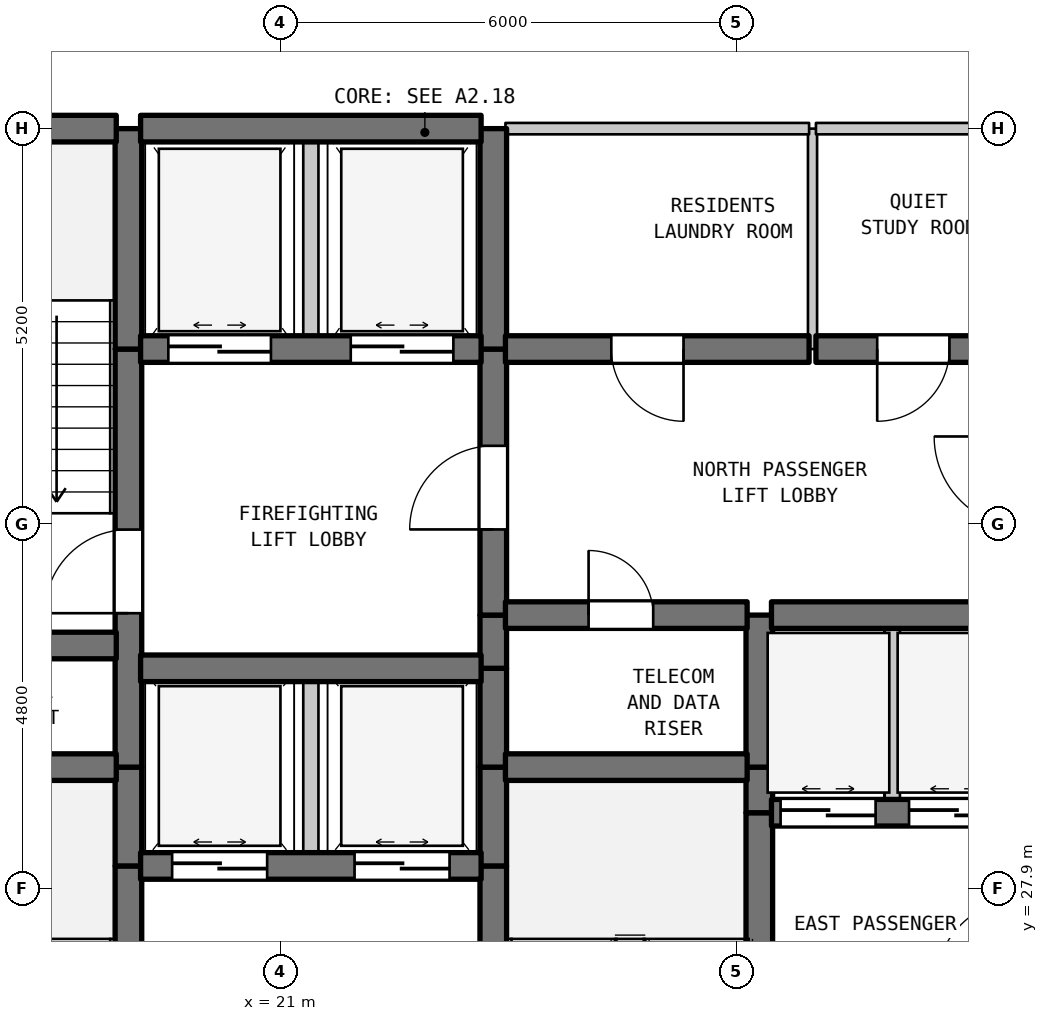
"""IFC4 building model, lengths in metres.
Left out: names, types, materials, properties, quantities, classifications, styles, units other than length and angle.
Written with IfcOpenShell. Run it as: python <this file> out.ifc"""

import sys

from ifc_helpers import new_model, si_unit, direction, frame, frame_2d, origin, place, context, subcontext, project, spatial, rectangle, extrude, element, fill, save


model = new_model("IFC4")
c1 = context("Model", 3, precision=1e-05, world=origin(), true_north=direction((0.0, 1.0)))
c2 = subcontext(c1, "Body", "Model", "MODEL_VIEW")
j1 = project(units=[si_unit("LENGTHUNIT", "METRE"), si_unit("PLANEANGLEUNIT", "RADIAN")], contexts=[c1])
p1 = place(None, origin())
s1 = spatial("IfcSite", under=j1, at=p1, CompositionType="ELEMENT")
p2 = place(p1, origin())
s2 = spatial("IfcBuilding", under=s1, at=p2, CompositionType="ELEMENT")
p3 = place(p2, frame((0.0, 0.0, 195.8)))
s3 = spatial("IfcBuildingStorey", under=s2, at=p3, CompositionType="ELEMENT", Elevation=195.8)
p4 = place(p3, frame((19.0, 22.7, 0.0), z_axis=(0.0, 0.0, 1.0), x_axis=(0.0, 1.0, 0.0)))
e1 = element("IfcWall", 1, at=p4, inside=s3, PredefinedType="SHEAR", context=c2, shape_type="SweptSolid", body=[
    extrude(rectangle(XDim=5.5, YDim=0.35, at=frame_2d((2.75, 0.0))), origin(), (0.0, 0.0, 1.0), 3.39),
])
p5 = place(p4, frame((0.631, 0.0, 0.0)))
e2 = element("IfcOpeningElement", 2, at=p5, cuts=e1, PredefinedType="OPENING", context=c2, shape_type="SweptSolid", body=[
    extrude(rectangle(XDim=1.1, YDim=2.15, at=frame_2d((0.55, 1.075))), frame((0.0, 0.185, 0.0), z_axis=(0.0, -1.0, 0.0), x_axis=(1.0, 0.0, 0.0)), (0.0, 0.0, 1.0), 0.37),
])
p6 = place(p3, frame((19.0, 28.2, 0.0), z_axis=(0.0, 0.0, 1.0), x_axis=(0.0, 1.0, 0.0)))
e3 = element("IfcWall", 3, at=p6, inside=s3, PredefinedType="SHEAR", context=c2, shape_type="SweptSolid", body=[
    extrude(rectangle(XDim=1.3, YDim=0.35, at=frame_2d((0.65, 0.0))), origin(), (0.0, 0.0, 1.0), 3.39),
])
p7 = place(p3, frame((19.0, 29.5, 0.0), z_axis=(0.0, 0.0, 1.0), x_axis=(0.0, 1.0, 0.0)))
e4 = element("IfcWall", 4, at=p7, inside=s3, PredefinedType="SHEAR", context=c2, shape_type="SweptSolid", body=[
    extrude(rectangle(XDim=5.5, YDim=0.35, at=frame_2d((2.75, 0.0))), origin(), (0.0, 0.0, 1.0), 3.39),
])
p8 = place(p7, frame((2.025, 0.0, 0.0)))
e5 = element("IfcOpeningElement", 5, at=p8, cuts=e4, PredefinedType="OPENING", context=c2, shape_type="SweptSolid", body=[
    extrude(rectangle(XDim=1.1, YDim=2.15, at=frame_2d((0.55, 1.075))), frame((0.0, 0.185, 0.0), z_axis=(0.0, -1.0, 0.0), x_axis=(1.0, 0.0, 0.0)), (0.0, 0.0, 1.0), 0.37),
])
p9 = place(p3, frame((19.0, 35.0, 0.0), z_axis=(0.0, 0.0, 1.0), x_axis=(0.0, 1.0, 0.0)))
e6 = element("IfcWall", 6, at=p9, inside=s3, PredefinedType="SHEAR", context=c2, shape_type="SweptSolid", body=[
    extrude(rectangle(XDim=2.9, YDim=0.35, at=frame_2d((1.45, 0.0))), origin(), (0.0, 0.0, 1.0), 3.39),
])
p10 = place(p3, frame((21.4, 28.2, 0.0), z_axis=(0.0, 0.0, 1.0), x_axis=(0.0, 1.0, 0.0)))
e7 = element("IfcWall", 7, at=p10, inside=s3, PredefinedType="STANDARD", context=c2, shape_type="SweptSolid", body=[
    extrude(rectangle(XDim=2.6, YDim=0.2, at=frame_2d((1.3, 0.0))), origin(), (0.0, 0.0, 1.0), 3.39),
])
p11 = place(p3, frame((21.4, 35.0, 0.0), z_axis=(0.0, 0.0, 1.0), x_axis=(0.0, 1.0, 0.0)))
e8 = element("IfcWall", 8, at=p11, inside=s3, PredefinedType="STANDARD", context=c2, shape_type="SweptSolid", body=[
    extrude(rectangle(XDim=2.9, YDim=0.2, at=frame_2d((1.45, 0.0))), origin(), (0.0, 0.0, 1.0), 3.39),
])
p12 = place(p3, frame((23.8, 22.7, 0.0), z_axis=(0.0, 0.0, 1.0), x_axis=(0.0, 1.0, 0.0)))
e9 = element("IfcWall", 9, at=p12, inside=s3, PredefinedType="SHEAR", context=c2, shape_type="SweptSolid", body=[
    extrude(rectangle(XDim=5.5, YDim=0.35, at=frame_2d((2.75, 0.0))), origin(), (0.0, 0.0, 1.0), 3.39),
])
p13 = place(p12, frame((0.235, 0.0, 0.0)))
e10 = element("IfcOpeningElement", 10, at=p13, cuts=e9, PredefinedType="OPENING", context=c2, shape_type="SweptSolid", body=[
    extrude(rectangle(XDim=1.1, YDim=2.15, at=frame_2d((0.55, 1.075))), frame((0.0, 0.185, 0.0), z_axis=(0.0, -1.0, 0.0), x_axis=(1.0, 0.0, 0.0)), (0.0, 0.0, 1.0), 0.37),
])
for number, where, z_axis, x_axis in (
    (11, (23.8, 28.2, 0.0), (0.0, 0.0, 1.0), (0.0, 1.0, 0.0)),
    (12, (23.8, 29.5, 0.0), (0.0, 0.0, 1.0), (0.0, 1.0, 0.0)),
):
    element("IfcWall", number, at=place(p3, frame(where, z_axis=z_axis, x_axis=x_axis)), inside=s3, PredefinedType="SHEAR", context=c2, shape_type="SweptSolid", body=[
        extrude(rectangle(XDim=1.3, YDim=0.35, at=frame_2d((0.65, 0.0))), origin(), (0.0, 0.0, 1.0), 3.39),
    ])
p14 = place(p3, frame((23.8, 30.8, 0.0), z_axis=(0.0, 0.0, 1.0), x_axis=(0.0, 1.0, 0.0)))
e13 = element("IfcWall", 13, at=p14, inside=s3, PredefinedType="SHEAR", context=c2, shape_type="SweptSolid", body=[
    extrude(rectangle(XDim=0.7, YDim=0.35, at=frame_2d((0.35, 0.0))), origin(), (0.0, 0.0, 1.0), 3.39),
])
p15 = place(p3, frame((23.8, 31.5, 0.0), z_axis=(0.0, 0.0, 1.0), x_axis=(0.0, 1.0, 0.0)))
e14 = element("IfcWall", 14, at=p15, inside=s3, PredefinedType="SHEAR", context=c2, shape_type="SweptSolid", body=[
    extrude(rectangle(XDim=3.5, YDim=0.35, at=frame_2d((1.75, 0.0))), origin(), (0.0, 0.0, 1.0), 3.39),
])
p16 = place(p15, frame((1.127, 0.0, 0.0)))
e15 = element("IfcOpeningElement", 15, at=p16, cuts=e14, PredefinedType="OPENING", context=c2, shape_type="SweptSolid", body=[
    extrude(rectangle(XDim=1.1, YDim=2.15, at=frame_2d((0.55, 1.075))), frame((0.0, 0.185, 0.0), z_axis=(0.0, -1.0, 0.0), x_axis=(1.0, 0.0, 0.0)), (0.0, 0.0, 1.0), 0.37),
])
p17 = place(p3, frame((23.8, 35.0, 0.0), z_axis=(0.0, 0.0, 1.0), x_axis=(0.0, 1.0, 0.0)))
e16 = element("IfcWall", 16, at=p17, inside=s3, PredefinedType="SHEAR", context=c2, shape_type="SweptSolid", body=[
    extrude(rectangle(XDim=2.9, YDim=0.35, at=frame_2d((1.45, 0.0))), origin(), (0.0, 0.0, 1.0), 3.39),
])
p18 = place(p3, frame((27.3, 25.6, 0.0), z_axis=(0.0, 0.0, 1.0), x_axis=(0.0, 1.0, 0.0)))
e17 = element("IfcWall", 17, at=p18, inside=s3, PredefinedType="SHEAR", context=c2, shape_type="SweptSolid", body=[
    extrude(rectangle(XDim=3.3, YDim=0.35, at=frame_2d((1.65, 0.0))), origin(), (0.0, 0.0, 1.0), 3.39),
])
p19 = place(p3, frame((27.3, 28.9, 0.0), z_axis=(0.0, 0.0, 1.0), x_axis=(0.0, 1.0, 0.0)))
e18 = element("IfcWall", 18, at=p19, inside=s3, PredefinedType="SHEAR", context=c2, shape_type="SweptSolid", body=[
    extrude(rectangle(XDim=0.6, YDim=0.35, at=frame_2d((0.3, 0.0))), origin(), (0.0, 0.0, 1.0), 3.39),
])
p20 = place(p3, frame((27.3, 29.5, 0.0), z_axis=(0.0, 0.0, 1.0), x_axis=(0.0, 1.0, 0.0)))
e19 = element("IfcWall", 19, at=p20, inside=s3, PredefinedType="SHEAR", context=c2, shape_type="SweptSolid", body=[
    extrude(rectangle(XDim=2.0, YDim=0.35, at=frame_2d((1.0, 0.0))), origin(), (0.0, 0.0, 1.0), 3.39),
])
p21 = place(p3, frame((28.0, 35.0, 0.0), z_axis=(0.0, 0.0, 1.0), x_axis=(0.0, 1.0, 0.0)))
e20 = element("IfcWall", 20, at=p21, inside=s3, PredefinedType="PARTITIONING", context=c2, shape_type="SweptSolid", body=[
    extrude(rectangle(XDim=2.9, YDim=0.12, at=frame_2d((1.45, 0.0))), origin(), (0.0, 0.0, 1.0), 3.39),
])
p22 = place(p3, frame((29.05, 28.9, 0.0), z_axis=(0.0, 0.0, 1.0), x_axis=(0.0, 1.0, 0.0)))
e21 = element("IfcWall", 21, at=p22, inside=s3, PredefinedType="STANDARD", context=c2, shape_type="SweptSolid", body=[
    extrude(rectangle(XDim=2.6, YDim=0.2, at=frame_2d((1.3, 0.0))), origin(), (0.0, 0.0, 1.0), 3.39),
])
p23 = place(p3, frame((19.16, 28.2, 0.0), z_axis=(0.0, 0.0, 1.0), x_axis=(1.0, 0.0, 0.0)))
e22 = element("IfcWall", 22, at=p23, inside=s3, PredefinedType="SHEAR", context=c2, shape_type="SweptSolid", body=[
    extrude(rectangle(XDim=4.48, YDim=0.35, at=frame_2d((2.24, 0.0))), origin(), (0.0, 0.0, 1.0), 3.39),
])
p24 = place(p23, frame((0.415, 0.0, 0.0)))
e23 = element("IfcOpeningElement", 23, at=p24, cuts=e22, PredefinedType="OPENING", context=c2, shape_type="SweptSolid", body=[
    extrude(rectangle(XDim=1.25, YDim=2.2, at=frame_2d((0.625, 1.1))), frame((0.0, 0.185, 0.0), z_axis=(0.0, -1.0, 0.0), x_axis=(1.0, 0.0, 0.0)), (0.0, 0.0, 1.0), 0.37),
])
p25 = place(p23, frame((2.815, 0.0, 0.0)))
e24 = element("IfcOpeningElement", 24, at=p25, cuts=e22, PredefinedType="OPENING", context=c2, shape_type="SweptSolid", body=[
    extrude(rectangle(XDim=1.25, YDim=2.2, at=frame_2d((0.625, 1.1))), frame((0.0, 0.185, 0.0), z_axis=(0.0, -1.0, 0.0), x_axis=(1.0, 0.0, 0.0)), (0.0, 0.0, 1.0), 0.37),
])
p26 = place(p3, frame((27.46, 28.9, 0.0), z_axis=(0.0, 0.0, 1.0), x_axis=(1.0, 0.0, 0.0)))
e25 = element("IfcWall", 25, at=p26, inside=s3, PredefinedType="SHEAR", context=c2, shape_type="SweptSolid", body=[
    extrude(rectangle(XDim=3.18, YDim=0.35, at=frame_2d((1.59, 0.0))), origin(), (0.0, 0.0, 1.0), 3.39),
])
p27 = place(p26, frame((0.12, 0.0, 0.0)))
e26 = element("IfcOpeningElement", 26, at=p27, cuts=e25, PredefinedType="OPENING", context=c2, shape_type="SweptSolid", body=[
    extrude(rectangle(XDim=1.25, YDim=2.2, at=frame_2d((0.625, 1.1))), frame((0.0, 0.185, 0.0), z_axis=(0.0, -1.0, 0.0), x_axis=(1.0, 0.0, 0.0)), (0.0, 0.0, 1.0), 0.37),
])
p28 = place(p26, frame((1.81, 0.0, 0.0)))
e27 = element("IfcOpeningElement", 27, at=p28, cuts=e25, PredefinedType="OPENING", context=c2, shape_type="SweptSolid", body=[
    extrude(rectangle(XDim=1.25, YDim=2.2, at=frame_2d((0.625, 1.1))), frame((0.0, 0.185, 0.0), z_axis=(0.0, -1.0, 0.0), x_axis=(1.0, 0.0, 0.0)), (0.0, 0.0, 1.0), 0.37),
])
p29 = place(p3, frame((15.16, 29.5, 0.0), z_axis=(0.0, 0.0, 1.0), x_axis=(1.0, 0.0, 0.0)))
e28 = element("IfcWall", 28, at=p29, inside=s3, PredefinedType="SHEAR", context=c2, shape_type="SweptSolid", body=[
    extrude(rectangle(XDim=3.68, YDim=0.35, at=frame_2d((1.84, 0.0))), origin(), (0.0, 0.0, 1.0), 3.39),
])
p30 = place(p3, frame((23.96, 29.5, 0.0), z_axis=(0.0, 0.0, 1.0), x_axis=(1.0, 0.0, 0.0)))
e29 = element("IfcWall", 29, at=p30, inside=s3, PredefinedType="SHEAR", context=c2, shape_type="SweptSolid", body=[
    extrude(rectangle(XDim=3.18, YDim=0.35, at=frame_2d((1.59, 0.0))), origin(), (0.0, 0.0, 1.0), 3.39),
])
p31 = place(p3, frame((19.16, 30.8, 0.0), z_axis=(0.0, 0.0, 1.0), x_axis=(1.0, 0.0, 0.0)))
e30 = element("IfcWall", 30, at=p31, inside=s3, PredefinedType="SHEAR", context=c2, shape_type="SweptSolid", body=[
    extrude(rectangle(XDim=4.48, YDim=0.35, at=frame_2d((2.24, 0.0))), origin(), (0.0, 0.0, 1.0), 3.39),
])
p32 = place(p3, frame((15.16, 31.1, 0.0), z_axis=(0.0, 0.0, 1.0), x_axis=(1.0, 0.0, 0.0)))
e31 = element("IfcWall", 31, at=p32, inside=s3, PredefinedType="SHEAR", context=c2, shape_type="SweptSolid", body=[
    extrude(rectangle(XDim=3.68, YDim=0.35, at=frame_2d((1.84, 0.0))), origin(), (0.0, 0.0, 1.0), 3.39),
])
p33 = place(p3, frame((23.96, 31.5, 0.0), z_axis=(0.0, 0.0, 1.0), x_axis=(1.0, 0.0, 0.0)))
e32 = element("IfcWall", 32, at=p33, inside=s3, PredefinedType="SHEAR", context=c2, shape_type="SweptSolid", body=[
    extrude(rectangle(XDim=3.18, YDim=0.35, at=frame_2d((1.59, 0.0))), origin(), (0.0, 0.0, 1.0), 3.39),
])
p34 = place(p33, frame((1.094, 0.0, 0.0)))
e33 = element("IfcOpeningElement", 33, at=p34, cuts=e32, PredefinedType="OPENING", context=c2, shape_type="SweptSolid", body=[
    extrude(rectangle(XDim=0.85, YDim=2.1, at=frame_2d((0.425, 1.05))), frame((0.0, 0.185, 0.0), z_axis=(0.0, -1.0, 0.0), x_axis=(1.0, 0.0, 0.0)), (0.0, 0.0, 1.0), 0.37),
])
p35 = place(p3, frame((27.46, 31.5, 0.0), z_axis=(0.0, 0.0, 1.0), x_axis=(1.0, 0.0, 0.0)))
e34 = element("IfcWall", 34, at=p35, inside=s3, PredefinedType="SHEAR", context=c2, shape_type="SweptSolid", body=[
    extrude(rectangle(XDim=3.18, YDim=0.35, at=frame_2d((1.59, 0.0))), origin(), (0.0, 0.0, 1.0), 3.39),
])
p36 = place(p3, frame((19.16, 35.0, 0.0), z_axis=(0.0, 0.0, 1.0), x_axis=(1.0, 0.0, 0.0)))
e35 = element("IfcWall", 35, at=p36, inside=s3, PredefinedType="SHEAR", context=c2, shape_type="SweptSolid", body=[
    extrude(rectangle(XDim=4.48, YDim=0.35, at=frame_2d((2.24, 0.0))), origin(), (0.0, 0.0, 1.0), 3.39),
])
p37 = place(p36, frame((0.365, 0.0, 0.0)))
e36 = element("IfcOpeningElement", 36, at=p37, cuts=e35, PredefinedType="OPENING", context=c2, shape_type="SweptSolid", body=[
    extrude(rectangle(XDim=1.35, YDim=2.2, at=frame_2d((0.675, 1.1))), frame((0.0, 0.185, 0.0), z_axis=(0.0, -1.0, 0.0), x_axis=(1.0, 0.0, 0.0)), (0.0, 0.0, 1.0), 0.37),
])
p38 = place(p36, frame((2.765, 0.0, 0.0)))
e37 = element("IfcOpeningElement", 37, at=p38, cuts=e35, PredefinedType="OPENING", context=c2, shape_type="SweptSolid", body=[
    extrude(rectangle(XDim=1.35, YDim=2.2, at=frame_2d((0.675, 1.1))), frame((0.0, 0.185, 0.0), z_axis=(0.0, -1.0, 0.0), x_axis=(1.0, 0.0, 0.0)), (0.0, 0.0, 1.0), 0.37),
])
p39 = place(p3, frame((23.96, 35.0, 0.0), z_axis=(0.0, 0.0, 1.0), x_axis=(1.0, 0.0, 0.0)))
e38 = element("IfcWall", 38, at=p39, inside=s3, PredefinedType="SHEAR", context=c2, shape_type="SweptSolid", body=[
    extrude(rectangle(XDim=3.995, YDim=0.35, at=frame_2d((1.998, 0.0))), origin(), (0.0, 0.0, 1.0), 3.39),
])
p40 = place(p39, frame((1.393, 0.0, 0.0)))
e39 = element("IfcOpeningElement", 39, at=p40, cuts=e38, PredefinedType="OPENING", context=c2, shape_type="SweptSolid", body=[
    extrude(rectangle(XDim=0.95, YDim=2.15, at=frame_2d((0.475, 1.075))), frame((0.0, 0.185, 0.0), z_axis=(0.0, -1.0, 0.0), x_axis=(1.0, 0.0, 0.0)), (0.0, 0.0, 1.0), 0.37),
])
p41 = place(p3, frame((28.045, 35.0, 0.0), z_axis=(0.0, 0.0, 1.0), x_axis=(1.0, 0.0, 0.0)))
e40 = element("IfcWall", 40, at=p41, inside=s3, PredefinedType="SHEAR", context=c2, shape_type="SweptSolid", body=[
    extrude(rectangle(XDim=2.595, YDim=0.35, at=frame_2d((1.297, 0.0))), origin(), (0.0, 0.0, 1.0), 3.39),
])
p42 = place(p41, frame((0.806, 0.0, 0.0)))
e41 = element("IfcOpeningElement", 41, at=p42, cuts=e40, PredefinedType="OPENING", context=c2, shape_type="SweptSolid", body=[
    extrude(rectangle(XDim=0.95, YDim=2.15, at=frame_2d((0.475, 1.075))), frame((0.0, 0.185, 0.0), z_axis=(0.0, -1.0, 0.0), x_axis=(1.0, 0.0, 0.0)), (0.0, 0.0, 1.0), 0.37),
])
p43 = place(p3, frame((15.16, 37.9, 0.0), z_axis=(0.0, 0.0, 1.0), x_axis=(1.0, 0.0, 0.0)))
e42 = element("IfcWall", 42, at=p43, inside=s3, PredefinedType="SHEAR", context=c2, shape_type="SweptSolid", body=[
    extrude(rectangle(XDim=3.68, YDim=0.35, at=frame_2d((1.84, 0.0))), origin(), (0.0, 0.0, 1.0), 3.39),
])
p44 = place(p3, frame((19.16, 37.9, 0.0), z_axis=(0.0, 0.0, 1.0), x_axis=(1.0, 0.0, 0.0)))
e43 = element("IfcWall", 43, at=p44, inside=s3, PredefinedType="SHEAR", context=c2, shape_type="SweptSolid", body=[
    extrude(rectangle(XDim=4.48, YDim=0.35, at=frame_2d((2.24, 0.0))), origin(), (0.0, 0.0, 1.0), 3.39),
])
p45 = place(p3, frame((23.96, 37.9, 0.0), z_axis=(0.0, 0.0, 1.0), x_axis=(1.0, 0.0, 0.0)))
e44 = element("IfcWall", 44, at=p45, inside=s3, PredefinedType="STANDARD", context=c2, shape_type="SweptSolid", body=[
    extrude(rectangle(XDim=3.995, YDim=0.15, at=frame_2d((1.998, 0.0))), origin(), (0.0, 0.0, 1.0), 2.89),
])
p46 = place(p3, frame((28.045, 37.9, 0.0), z_axis=(0.0, 0.0, 1.0), x_axis=(1.0, 0.0, 0.0)))
e45 = element("IfcWall", 45, at=p46, inside=s3, PredefinedType="STANDARD", context=c2, shape_type="SweptSolid", body=[
    extrude(rectangle(XDim=2.695, YDim=0.15, at=frame_2d((1.348, 0.0))), origin(), (0.0, 0.0, 1.0), 2.89),
])
p47 = place(p8, origin())
e46 = element("IfcDoor", 46, at=p47, inside=s3, OperationType="SINGLE_SWING_LEFT", PredefinedType="DOOR", context=c2, shape_type="SweptSolid", body=[
    extrude(rectangle(XDim=1.1, YDim=2.15, at=frame_2d((0.55, 1.075))), frame((0.0, 0.025, 0.0), z_axis=(0.0, -1.0, 0.0), x_axis=(1.0, 0.0, 0.0)), (0.0, 0.0, 1.0), 0.05),
])
fill(e5, e46)
p48 = place(p16, origin())
e47 = element("IfcDoor", 47, at=p48, inside=s3, OperationType="SINGLE_SWING_LEFT", PredefinedType="DOOR", context=c2, shape_type="SweptSolid", body=[
    extrude(rectangle(XDim=1.1, YDim=2.15, at=frame_2d((0.55, 1.075))), frame((0.0, 0.025, 0.0), z_axis=(0.0, -1.0, 0.0), x_axis=(1.0, 0.0, 0.0)), (0.0, 0.0, 1.0), 0.05),
])
fill(e15, e47)
p49 = place(p24, origin())
e48 = element("IfcDoor", 48, at=p49, inside=s3, OperationType="DOUBLE_DOOR_SLIDING", PredefinedType="DOOR", context=c2, shape_type="SweptSolid", body=[
    extrude(rectangle(XDim=1.25, YDim=2.2, at=frame_2d((0.625, 1.1))), frame((0.0, 0.025, 0.0), z_axis=(0.0, -1.0, 0.0), x_axis=(1.0, 0.0, 0.0)), (0.0, 0.0, 1.0), 0.05),
])
fill(e23, e48)
p50 = place(p25, origin())
e49 = element("IfcDoor", 49, at=p50, inside=s3, OperationType="DOUBLE_DOOR_SLIDING", PredefinedType="DOOR", context=c2, shape_type="SweptSolid", body=[
    extrude(rectangle(XDim=1.25, YDim=2.2, at=frame_2d((0.625, 1.1))), frame((0.0, 0.025, 0.0), z_axis=(0.0, -1.0, 0.0), x_axis=(1.0, 0.0, 0.0)), (0.0, 0.0, 1.0), 0.05),
])
fill(e24, e49)
p51 = place(p27, origin())
e50 = element("IfcDoor", 50, at=p51, inside=s3, OperationType="DOUBLE_DOOR_SLIDING", PredefinedType="DOOR", context=c2, shape_type="SweptSolid", body=[
    extrude(rectangle(XDim=1.25, YDim=2.2, at=frame_2d((0.625, 1.1))), frame((0.0, 0.025, 0.0), z_axis=(0.0, -1.0, 0.0), x_axis=(1.0, 0.0, 0.0)), (0.0, 0.0, 1.0), 0.05),
])
fill(e26, e50)
p52 = place(p28, origin())
e51 = element("IfcDoor", 51, at=p52, inside=s3, OperationType="DOUBLE_DOOR_SLIDING", PredefinedType="DOOR", context=c2, shape_type="SweptSolid", body=[
    extrude(rectangle(XDim=1.25, YDim=2.2, at=frame_2d((0.625, 1.1))), frame((0.0, 0.025, 0.0), z_axis=(0.0, -1.0, 0.0), x_axis=(1.0, 0.0, 0.0)), (0.0, 0.0, 1.0), 0.05),
])
fill(e27, e51)
p53 = place(p34, origin())
e52 = element("IfcDoor", 52, at=p53, inside=s3, OperationType="SINGLE_SWING_LEFT", PredefinedType="DOOR", context=c2, shape_type="SweptSolid", body=[
    extrude(rectangle(XDim=0.85, YDim=2.1, at=frame_2d((0.425, 1.05))), frame((0.0, 0.025, 0.0), z_axis=(0.0, -1.0, 0.0), x_axis=(1.0, 0.0, 0.0)), (0.0, 0.0, 1.0), 0.05),
])
fill(e33, e52)
p54 = place(p37, origin())
e53 = element("IfcDoor", 53, at=p54, inside=s3, OperationType="DOUBLE_DOOR_SLIDING", PredefinedType="DOOR", context=c2, shape_type="SweptSolid", body=[
    extrude(rectangle(XDim=1.35, YDim=2.2, at=frame_2d((0.675, 1.1))), frame((0.0, 0.025, 0.0), z_axis=(0.0, -1.0, 0.0), x_axis=(1.0, 0.0, 0.0)), (0.0, 0.0, 1.0), 0.05),
])
fill(e36, e53)
p55 = place(p38, origin())
e54 = element("IfcDoor", 54, at=p55, inside=s3, OperationType="DOUBLE_DOOR_SLIDING", PredefinedType="DOOR", context=c2, shape_type="SweptSolid", body=[
    extrude(rectangle(XDim=1.35, YDim=2.2, at=frame_2d((0.675, 1.1))), frame((0.0, 0.025, 0.0), z_axis=(0.0, -1.0, 0.0), x_axis=(1.0, 0.0, 0.0)), (0.0, 0.0, 1.0), 0.05),
])
fill(e37, e54)
p56 = place(p40, frame((0.95, 0.0, 0.0), z_axis=(0.0, 0.0, 1.0), x_axis=(-1.0, 0.0, 0.0)))
e55 = element("IfcDoor", 55, at=p56, inside=s3, OperationType="SINGLE_SWING_RIGHT", PredefinedType="DOOR", context=c2, shape_type="SweptSolid", body=[
    extrude(rectangle(XDim=0.95, YDim=2.15, at=frame_2d((0.475, 1.075))), frame((0.0, 0.025, 0.0), z_axis=(0.0, -1.0, 0.0), x_axis=(1.0, 0.0, 0.0)), (0.0, 0.0, 1.0), 0.05),
])
fill(e39, e55)
p57 = place(p42, frame((0.95, 0.0, 0.0), z_axis=(0.0, 0.0, 1.0), x_axis=(-1.0, 0.0, 0.0)))
e56 = element("IfcDoor", 56, at=p57, inside=s3, OperationType="SINGLE_SWING_LEFT", PredefinedType="DOOR", context=c2, shape_type="SweptSolid", body=[
    extrude(rectangle(XDim=0.95, YDim=2.15, at=frame_2d((0.475, 1.075))), frame((0.0, 0.025, 0.0), z_axis=(0.0, -1.0, 0.0), x_axis=(1.0, 0.0, 0.0)), (0.0, 0.0, 1.0), 0.05),
])
fill(e41, e56)
save(model, sys.argv[1])
